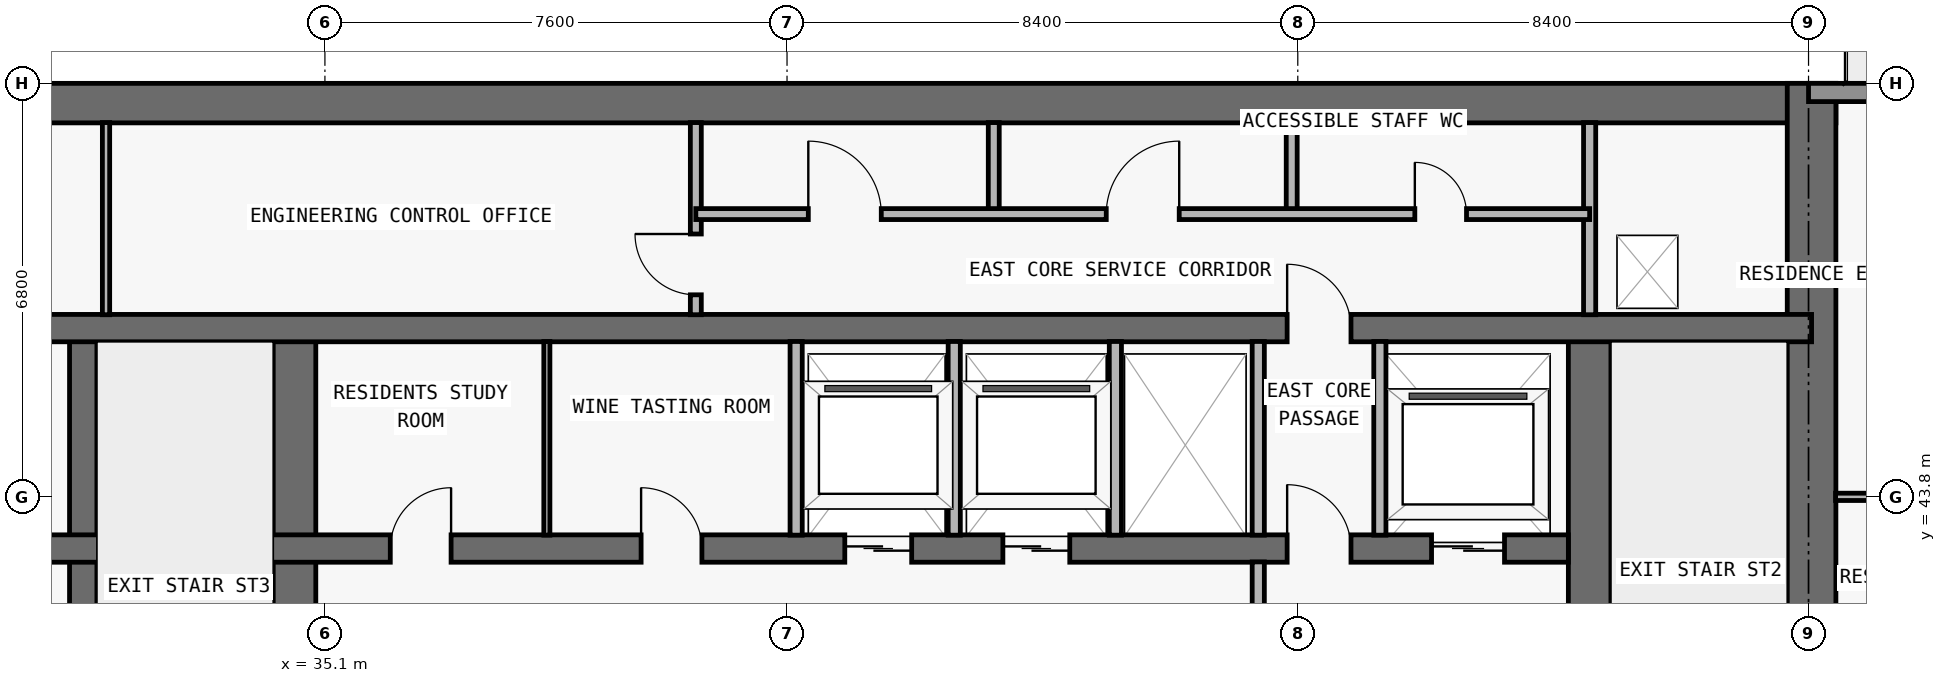
"""IFC4 building model, lengths in metres.
Left out: names, types, materials, properties, quantities, classifications, styles, units other than length and angle.
Written with IfcOpenShell. Run it as: python <this file> out.ifc"""

import sys

from ifc_helpers import new_model, si_unit, direction, frame, frame_2d, origin, place, context, subcontext, project, spatial, rectangle, extrude, element, fill, save


model = new_model("IFC4")
c1 = context("Model", 3, precision=1e-05, world=origin(), true_north=direction((0.0, 1.0)))
c2 = subcontext(c1, "Body", "Model", "MODEL_VIEW")
j1 = project(units=[si_unit("LENGTHUNIT", "METRE"), si_unit("PLANEANGLEUNIT", "RADIAN")], contexts=[c1])
p1 = place(None, origin())
s1 = spatial("IfcSite", under=j1, at=p1, CompositionType="ELEMENT")
p2 = place(p1, origin())
s2 = spatial("IfcBuilding", under=s1, at=p2, CompositionType="ELEMENT")
p3 = place(p2, frame((0.0, 0.0, 119.1)))
s3 = spatial("IfcBuildingStorey", under=s2, at=p3, CompositionType="ELEMENT", Elevation=119.1)
p4 = place(p3, frame((17.85, 50.275, 0.0), z_axis=(0.0, 0.0, 1.0), x_axis=(1.0, 0.0, 0.0)))
e1 = element("IfcWall", 1, at=p4, inside=s3, PredefinedType="SHEAR", context=c2, shape_type="SweptSolid", body=[
    extrude(rectangle(XDim=42.1, YDim=0.65, at=frame_2d((21.05, 0.0))), origin(), (0.0, 0.0, 1.0), 3.05),
])
p5 = place(p3, frame((59.55, 36.55, 0.0), z_axis=(0.0, 0.0, 1.0), x_axis=(0.0, 1.0, 0.0)))
e2 = element("IfcWall", 2, at=p5, inside=s3, PredefinedType="SHEAR", context=c2, shape_type="SweptSolid", body=[
    extrude(rectangle(XDim=14.05, YDim=0.8, at=frame_2d((7.025, 0.0))), origin(), (0.0, 0.0, 1.0), 3.05),
])
p6 = place(p3, frame((55.9, 36.95, 0.0), z_axis=(0.0, 0.0, 1.0), x_axis=(0.0, 1.0, 0.0)))
e3 = element("IfcWall", 3, at=p6, inside=s3, PredefinedType="SHEAR", context=c2, shape_type="SweptSolid", body=[
    extrude(rectangle(XDim=9.625, YDim=0.7, at=frame_2d((4.812, 0.0))), origin(), (0.0, 0.0, 1.0), 3.05),
])
p7 = place(p6, frame((0.6, 0.0, 0.0)))
e4 = element("IfcOpeningElement", 4, at=p7, cuts=e3, PredefinedType="OPENING", context=c2, shape_type="SweptSolid", body=[
    extrude(rectangle(XDim=1.1, YDim=2.15, at=frame_2d((0.55, 1.075))), frame((0.0, 0.36, 0.0), z_axis=(0.0, -1.0, 0.0), x_axis=(1.0, 0.0, 0.0)), (0.0, 0.0, 1.0), 0.72),
])
p8 = place(p3, frame((31.125, 36.95, 0.0), z_axis=(0.0, 0.0, 1.0), x_axis=(0.0, 1.0, 0.0)))
e5 = element("IfcWall", 5, at=p8, inside=s3, PredefinedType="SHEAR", context=c2, shape_type="SweptSolid", body=[
    extrude(rectangle(XDim=9.625, YDim=0.45, at=frame_2d((4.812, 0.0))), origin(), (0.0, 0.0, 1.0), 3.05),
])
p9 = place(p3, frame((34.6, 36.95, 0.0), z_axis=(0.0, 0.0, 1.0), x_axis=(0.0, 1.0, 0.0)))
e6 = element("IfcWall", 6, at=p9, inside=s3, PredefinedType="SHEAR", context=c2, shape_type="SweptSolid", body=[
    extrude(rectangle(XDim=9.625, YDim=0.7, at=frame_2d((4.812, 0.0))), origin(), (0.0, 0.0, 1.0), 3.05),
])
p10 = place(p3, frame((22.25, 42.95, 0.0), z_axis=(0.0, 0.0, 1.0), x_axis=(1.0, 0.0, 0.0)))
e7 = element("IfcWall", 7, at=p10, inside=s3, PredefinedType="SHEAR", context=c2, shape_type="SweptSolid", body=[
    extrude(rectangle(XDim=33.3, YDim=0.45, at=frame_2d((16.65, 0.0))), origin(), (0.0, 0.0, 1.0), 3.05),
])
p11 = place(p10, frame((1.05, 0.0, 0.0)))
e8 = element("IfcOpeningElement", 8, at=p11, cuts=e7, PredefinedType="OPENING", context=c2, shape_type="SweptSolid", body=[
    extrude(rectangle(XDim=1.2, YDim=2.2, at=frame_2d((0.6, 1.1))), frame((0.0, 0.235, 0.0), z_axis=(0.0, -1.0, 0.0), x_axis=(1.0, 0.0, 0.0)), (0.0, 0.0, 1.0), 0.47),
])
p12 = place(p10, frame((31.05, 0.0, 0.0)))
e9 = element("IfcOpeningElement", 9, at=p12, cuts=e7, PredefinedType="OPENING", context=c2, shape_type="SweptSolid", body=[
    extrude(rectangle(XDim=1.2, YDim=2.2, at=frame_2d((0.6, 1.1))), frame((0.0, 0.235, 0.0), z_axis=(0.0, -1.0, 0.0), x_axis=(1.0, 0.0, 0.0)), (0.0, 0.0, 1.0), 0.47),
])
p13 = place(p10, frame((21.4, 0.0, 0.0)))
e10 = element("IfcOpeningElement", 10, at=p13, cuts=e7, PredefinedType="OPENING", context=c2, shape_type="SweptSolid", body=[
    extrude(rectangle(XDim=1.1, YDim=2.2, at=frame_2d((0.55, 1.1))), frame((0.0, 0.235, 0.0), z_axis=(0.0, -1.0, 0.0), x_axis=(1.0, 0.0, 0.0)), (0.0, 0.0, 1.0), 0.47),
])
p14 = place(p10, frame((24.0, 0.0, 0.0)))
e11 = element("IfcOpeningElement", 11, at=p14, cuts=e7, PredefinedType="OPENING", context=c2, shape_type="SweptSolid", body=[
    extrude(rectangle(XDim=1.1, YDim=2.2, at=frame_2d((0.55, 1.1))), frame((0.0, 0.235, 0.0), z_axis=(0.0, -1.0, 0.0), x_axis=(1.0, 0.0, 0.0)), (0.0, 0.0, 1.0), 0.47),
])
p15 = place(p10, frame((3.625, 0.0, 0.0)))
e12 = element("IfcOpeningElement", 12, at=p15, cuts=e7, PredefinedType="OPENING", context=c2, shape_type="SweptSolid", body=[
    extrude(rectangle(XDim=1.05, YDim=2.15, at=frame_2d((0.525, 1.075))), frame((0.0, 0.235, 0.0), z_axis=(0.0, -1.0, 0.0), x_axis=(1.0, 0.0, 0.0)), (0.0, 0.0, 1.0), 0.47),
])
p16 = place(p10, frame((28.675, 0.0, 0.0)))
e13 = element("IfcOpeningElement", 13, at=p16, cuts=e7, PredefinedType="OPENING", context=c2, shape_type="SweptSolid", body=[
    extrude(rectangle(XDim=1.05, YDim=2.15, at=frame_2d((0.525, 1.075))), frame((0.0, 0.235, 0.0), z_axis=(0.0, -1.0, 0.0), x_axis=(1.0, 0.0, 0.0)), (0.0, 0.0, 1.0), 0.47),
])
p17 = place(p10, frame((13.925, 0.0, 0.0)))
e14 = element("IfcOpeningElement", 14, at=p17, cuts=e7, PredefinedType="OPENING", context=c2, shape_type="SweptSolid", body=[
    extrude(rectangle(XDim=1.0, YDim=2.2, at=frame_2d((0.5, 1.1))), frame((0.0, 0.235, 0.0), z_axis=(0.0, -1.0, 0.0), x_axis=(1.0, 0.0, 0.0)), (0.0, 0.0, 1.0), 0.47),
])
p18 = place(p10, frame((18.05, 0.0, 0.0)))
e15 = element("IfcOpeningElement", 15, at=p18, cuts=e7, PredefinedType="OPENING", context=c2, shape_type="SweptSolid", body=[
    extrude(rectangle(XDim=1.0, YDim=2.2, at=frame_2d((0.5, 1.1))), frame((0.0, 0.235, 0.0), z_axis=(0.0, -1.0, 0.0), x_axis=(1.0, 0.0, 0.0)), (0.0, 0.0, 1.0), 0.47),
])
p19 = place(p3, frame((18.25, 46.575, 0.0), z_axis=(0.0, 0.0, 1.0), x_axis=(1.0, 0.0, 0.0)))
e16 = element("IfcWall", 16, at=p19, inside=s3, PredefinedType="SHEAR", context=c2, shape_type="SweptSolid", body=[
    extrude(rectangle(XDim=41.3, YDim=0.45, at=frame_2d((20.65, 0.0))), origin(), (0.0, 0.0, 1.0), 3.05),
])
p20 = place(p19, frame((7.65, 0.0, 0.0)))
e17 = element("IfcOpeningElement", 17, at=p20, cuts=e16, PredefinedType="OPENING", context=c2, shape_type="SweptSolid", body=[
    extrude(rectangle(XDim=1.0, YDim=2.2, at=frame_2d((0.5, 1.1))), frame((0.0, 0.235, 0.0), z_axis=(0.0, -1.0, 0.0), x_axis=(1.0, 0.0, 0.0)), (0.0, 0.0, 1.0), 0.47),
])
p21 = place(p19, frame((32.675, 0.0, 0.0)))
e18 = element("IfcOpeningElement", 18, at=p21, cuts=e16, PredefinedType="OPENING", context=c2, shape_type="SweptSolid", body=[
    extrude(rectangle(XDim=1.05, YDim=2.15, at=frame_2d((0.525, 1.075))), frame((0.0, 0.235, 0.0), z_axis=(0.0, -1.0, 0.0), x_axis=(1.0, 0.0, 0.0)), (0.0, 0.0, 1.0), 0.47),
])
p22 = place(p3, frame((59.5, 50.45, 0.0), z_axis=(0.0, 0.0, 1.0), x_axis=(1.0, 0.0, 0.0)))
e19 = element("IfcWall", 19, at=p22, inside=s3, PredefinedType="STANDARD", context=c2, shape_type="SweptSolid", body=[
    extrude(rectangle(XDim=10.6, YDim=0.3, at=frame_2d((5.3, 0.0))), origin(), (0.0, 0.0, 1.0), 3.05),
])
p23 = place(p22, frame((4.3, 0.0, 0.0)))
e20 = element("IfcOpeningElement", 20, at=p23, cuts=e19, PredefinedType="OPENING", context=c2, shape_type="SweptSolid", body=[
    extrude(rectangle(XDim=2.0, YDim=2.3, at=frame_2d((1.0, 1.15))), frame((0.0, 0.16, 0.0), z_axis=(0.0, -1.0, 0.0), x_axis=(1.0, 0.0, 0.0)), (0.0, 0.0, 1.0), 0.32),
])
p24 = place(p3, frame((31.5, 46.795, 0.0), z_axis=(0.0, 0.0, 1.0), x_axis=(0.0, 1.0, 0.0)))
e21 = element("IfcWall", 21, at=p24, inside=s3, PredefinedType="PARTITIONING", context=c2, shape_type="SweptSolid", body=[
    extrude(rectangle(XDim=3.16, YDim=0.12, at=frame_2d((1.58, 0.0))), origin(), (0.0, 0.0, 1.0), 3.05),
])
p25 = place(p3, frame((38.75, 43.17, 0.0), z_axis=(0.0, 0.0, 1.0), x_axis=(0.0, 1.0, 0.0)))
e22 = element("IfcWall", 22, at=p25, inside=s3, PredefinedType="MOVABLE", context=c2, shape_type="SweptSolid", body=[
    extrude(rectangle(XDim=3.185, YDim=0.1, at=frame_2d((1.593, 0.0))), origin(), (0.0, 0.0, 1.0), 3.05),
])
p26 = place(p3, frame((41.2, 46.795, 0.0), z_axis=(0.0, 0.0, 1.0), x_axis=(0.0, 1.0, 0.0)))
e23 = element("IfcWall", 23, at=p26, inside=s3, PredefinedType="PARTITIONING", context=c2, shape_type="SweptSolid", body=[
    extrude(rectangle(XDim=3.16, YDim=0.18, at=frame_2d((1.58, 0.0))), origin(), (0.0, 0.0, 1.0), 3.05),
])
p27 = place(p26, frame((0.327, 0.0, 0.0)))
e24 = element("IfcOpeningElement", 24, at=p27, cuts=e23, PredefinedType="OPENING", context=c2, shape_type="SweptSolid", body=[
    extrude(rectangle(XDim=1.0, YDim=2.2, at=frame_2d((0.5, 1.1))), frame((0.0, 0.1, 0.0), z_axis=(0.0, -1.0, 0.0), x_axis=(1.0, 0.0, 0.0)), (0.0, 0.0, 1.0), 0.2),
])
for number, where, z_axis, x_axis in (
    (25, (42.85, 43.17, 0.0), (0.0, 0.0, 1.0), (0.0, 1.0, 0.0)),
    (26, (45.45, 43.17, 0.0), (0.0, 0.0, 1.0), (0.0, 1.0, 0.0)),
):
    element("IfcWall", number, at=place(p3, frame(where, z_axis=z_axis, x_axis=x_axis)), inside=s3, PredefinedType="PARTITIONING", context=c2, shape_type="SweptSolid", body=[
        extrude(rectangle(XDim=3.185, YDim=0.2, at=frame_2d((1.593, 0.0))), origin(), (0.0, 0.0, 1.0), 3.05),
    ])
p28 = place(p3, frame((46.1, 48.45, 0.0), z_axis=(0.0, 0.0, 1.0), x_axis=(0.0, 1.0, 0.0)))
e27 = element("IfcWall", 27, at=p28, inside=s3, PredefinedType="PARTITIONING", context=c2, shape_type="SweptSolid", body=[
    extrude(rectangle(XDim=1.505, YDim=0.18, at=frame_2d((0.752, 0.0))), origin(), (0.0, 0.0, 1.0), 3.05),
])
p29 = place(p3, frame((48.1, 43.17, 0.0), z_axis=(0.0, 0.0, 1.0), x_axis=(0.0, 1.0, 0.0)))
e28 = element("IfcWall", 28, at=p29, inside=s3, PredefinedType="PARTITIONING", context=c2, shape_type="SweptSolid", body=[
    extrude(rectangle(XDim=3.185, YDim=0.2, at=frame_2d((1.593, 0.0))), origin(), (0.0, 0.0, 1.0), 3.05),
])
p30 = place(p3, frame((50.45, 37.345, 0.0), z_axis=(0.0, 0.0, 1.0), x_axis=(0.0, 1.0, 0.0)))
e29 = element("IfcWall", 29, at=p30, inside=s3, PredefinedType="PARTITIONING", context=c2, shape_type="SweptSolid", body=[
    extrude(rectangle(XDim=5.385, YDim=0.2, at=frame_2d((2.692, 0.0))), origin(), (0.0, 0.0, 1.0), 3.05),
])
p31 = place(p3, frame((50.45, 43.17, 0.0), z_axis=(0.0, 0.0, 1.0), x_axis=(0.0, 1.0, 0.0)))
e30 = element("IfcWall", 30, at=p31, inside=s3, PredefinedType="PARTITIONING", context=c2, shape_type="SweptSolid", body=[
    extrude(rectangle(XDim=3.185, YDim=0.2, at=frame_2d((1.593, 0.0))), origin(), (0.0, 0.0, 1.0), 3.05),
])
p32 = place(p3, frame((51.0, 48.45, 0.0), z_axis=(0.0, 0.0, 1.0), x_axis=(0.0, 1.0, 0.0)))
e31 = element("IfcWall", 31, at=p32, inside=s3, PredefinedType="PARTITIONING", context=c2, shape_type="SweptSolid", body=[
    extrude(rectangle(XDim=1.505, YDim=0.18, at=frame_2d((0.752, 0.0))), origin(), (0.0, 0.0, 1.0), 3.05),
])
p33 = place(p3, frame((52.45, 43.17, 0.0), z_axis=(0.0, 0.0, 1.0), x_axis=(0.0, 1.0, 0.0)))
e32 = element("IfcWall", 32, at=p33, inside=s3, PredefinedType="PARTITIONING", context=c2, shape_type="SweptSolid", body=[
    extrude(rectangle(XDim=3.185, YDim=0.2, at=frame_2d((1.593, 0.0))), origin(), (0.0, 0.0, 1.0), 3.05),
])
p34 = place(p3, frame((55.9, 46.795, 0.0), z_axis=(0.0, 0.0, 1.0), x_axis=(0.0, 1.0, 0.0)))
e33 = element("IfcWall", 33, at=p34, inside=s3, PredefinedType="PARTITIONING", context=c2, shape_type="SweptSolid", body=[
    extrude(rectangle(XDim=3.16, YDim=0.2, at=frame_2d((1.58, 0.0))), origin(), (0.0, 0.0, 1.0), 3.05),
])
p35 = place(p3, frame((59.945, 43.8, 0.0), z_axis=(0.0, 0.0, 1.0), x_axis=(1.0, 0.0, 0.0)))
e34 = element("IfcWall", 34, at=p35, inside=s3, PredefinedType="PARTITIONING", context=c2, shape_type="SweptSolid", body=[
    extrude(rectangle(XDim=13.66, YDim=0.12, at=frame_2d((6.83, 0.0))), origin(), (0.0, 0.0, 1.0), 2.339),
])
p36 = place(p35, frame((4.017, 0.0, 0.0)))
e35 = element("IfcOpeningElement", 35, at=p36, cuts=e34, PredefinedType="OPENING", context=c2, shape_type="SweptSolid", body=[
    extrude(rectangle(XDim=0.9, YDim=2.15, at=frame_2d((0.45, 1.075))), frame((0.0, 0.07, 0.0), z_axis=(0.0, -1.0, 0.0), x_axis=(1.0, 0.0, 0.0)), (0.0, 0.0, 1.0), 0.14),
])
p37 = place(p35, frame((0.702, 0.0, 0.0)))
e36 = element("IfcOpeningElement", 36, at=p37, cuts=e34, PredefinedType="OPENING", context=c2, shape_type="SweptSolid", body=[
    extrude(rectangle(XDim=0.85, YDim=2.1, at=frame_2d((0.425, 1.05))), frame((0.0, 0.07, 0.0), z_axis=(0.0, -1.0, 0.0), x_axis=(1.0, 0.0, 0.0)), (0.0, 0.0, 1.0), 0.14),
])
p38 = place(p3, frame((41.2, 48.45, 0.0), z_axis=(0.0, 0.0, 1.0), x_axis=(1.0, 0.0, 0.0)))
e37 = element("IfcWall", 37, at=p38, inside=s3, PredefinedType="PARTITIONING", context=c2, shape_type="SweptSolid", body=[
    extrude(rectangle(XDim=14.7, YDim=0.18, at=frame_2d((7.35, 0.0))), origin(), (0.0, 0.0, 1.0), 3.05),
])
p39 = place(p38, frame((1.85, 0.0, 0.0)))
e38 = element("IfcOpeningElement", 38, at=p39, cuts=e37, PredefinedType="OPENING", context=c2, shape_type="SweptSolid", body=[
    extrude(rectangle(XDim=1.2, YDim=2.2, at=frame_2d((0.6, 1.1))), frame((0.0, 0.1, 0.0), z_axis=(0.0, -1.0, 0.0), x_axis=(1.0, 0.0, 0.0)), (0.0, 0.0, 1.0), 0.2),
])
p40 = place(p38, frame((6.75, 0.0, 0.0)))
e39 = element("IfcOpeningElement", 39, at=p40, cuts=e37, PredefinedType="OPENING", context=c2, shape_type="SweptSolid", body=[
    extrude(rectangle(XDim=1.2, YDim=2.2, at=frame_2d((0.6, 1.1))), frame((0.0, 0.1, 0.0), z_axis=(0.0, -1.0, 0.0), x_axis=(1.0, 0.0, 0.0)), (0.0, 0.0, 1.0), 0.2),
])
p41 = place(p38, frame((11.825, 0.0, 0.0)))
e40 = element("IfcOpeningElement", 40, at=p41, cuts=e37, PredefinedType="OPENING", context=c2, shape_type="SweptSolid", body=[
    extrude(rectangle(XDim=0.85, YDim=2.1, at=frame_2d((0.425, 1.05))), frame((0.0, 0.1, 0.0), z_axis=(0.0, -1.0, 0.0), x_axis=(1.0, 0.0, 0.0)), (0.0, 0.0, 1.0), 0.2),
])
p42 = place(p12, origin())
e41 = element("IfcDoor", 41, at=p42, inside=s3, OperationType="DOUBLE_DOOR_SLIDING", PredefinedType="DOOR", context=c2, shape_type="SweptSolid", body=[
    extrude(rectangle(XDim=1.2, YDim=2.2, at=frame_2d((0.6, 1.1))), frame((0.0, 0.025, 0.0), z_axis=(0.0, -1.0, 0.0), x_axis=(1.0, 0.0, 0.0)), (0.0, 0.0, 1.0), 0.05),
])
fill(e9, e41)
p43 = place(p13, origin())
e42 = element("IfcDoor", 42, at=p43, inside=s3, OperationType="DOUBLE_DOOR_SLIDING", PredefinedType="DOOR", context=c2, shape_type="SweptSolid", body=[
    extrude(rectangle(XDim=1.1, YDim=2.2, at=frame_2d((0.55, 1.1))), frame((0.0, 0.025, 0.0), z_axis=(0.0, -1.0, 0.0), x_axis=(1.0, 0.0, 0.0)), (0.0, 0.0, 1.0), 0.05),
])
fill(e10, e42)
p44 = place(p14, origin())
e43 = element("IfcDoor", 43, at=p44, inside=s3, OperationType="DOUBLE_DOOR_SLIDING", PredefinedType="DOOR", context=c2, shape_type="SweptSolid", body=[
    extrude(rectangle(XDim=1.1, YDim=2.2, at=frame_2d((0.55, 1.1))), frame((0.0, 0.025, 0.0), z_axis=(0.0, -1.0, 0.0), x_axis=(1.0, 0.0, 0.0)), (0.0, 0.0, 1.0), 0.05),
])
fill(e11, e43)
p45 = place(p16, origin())
e44 = element("IfcDoor", 44, at=p45, inside=s3, OperationType="SINGLE_SWING_LEFT", PredefinedType="DOOR", context=c2, shape_type="SweptSolid", body=[
    extrude(rectangle(XDim=1.05, YDim=2.15, at=frame_2d((0.525, 1.075))), frame((0.0, 0.025, 0.0), z_axis=(0.0, -1.0, 0.0), x_axis=(1.0, 0.0, 0.0)), (0.0, 0.0, 1.0), 0.05),
])
fill(e13, e44)
p46 = place(p17, origin())
e45 = element("IfcDoor", 45, at=p46, inside=s3, OperationType="SINGLE_SWING_RIGHT", PredefinedType="DOOR", context=c2, shape_type="SweptSolid", body=[
    extrude(rectangle(XDim=1.0, YDim=2.2, at=frame_2d((0.5, 1.1))), frame((0.0, 0.025, 0.0), z_axis=(0.0, -1.0, 0.0), x_axis=(1.0, 0.0, 0.0)), (0.0, 0.0, 1.0), 0.05),
])
fill(e14, e45)
p47 = place(p18, origin())
e46 = element("IfcDoor", 46, at=p47, inside=s3, OperationType="SINGLE_SWING_LEFT", PredefinedType="DOOR", context=c2, shape_type="SweptSolid", body=[
    extrude(rectangle(XDim=1.0, YDim=2.2, at=frame_2d((0.5, 1.1))), frame((0.0, 0.025, 0.0), z_axis=(0.0, -1.0, 0.0), x_axis=(1.0, 0.0, 0.0)), (0.0, 0.0, 1.0), 0.05),
])
fill(e15, e46)
p48 = place(p21, origin())
e47 = element("IfcDoor", 47, at=p48, inside=s3, OperationType="SINGLE_SWING_LEFT", PredefinedType="DOOR", context=c2, shape_type="SweptSolid", body=[
    extrude(rectangle(XDim=1.05, YDim=2.15, at=frame_2d((0.525, 1.075))), frame((0.0, 0.025, 0.0), z_axis=(0.0, -1.0, 0.0), x_axis=(1.0, 0.0, 0.0)), (0.0, 0.0, 1.0), 0.05),
])
fill(e18, e47)
p49 = place(p27, origin())
e48 = element("IfcDoor", 48, at=p49, inside=s3, OperationType="SINGLE_SWING_RIGHT", PredefinedType="DOOR", context=c2, shape_type="SweptSolid", body=[
    extrude(rectangle(XDim=1.0, YDim=2.2, at=frame_2d((0.5, 1.1))), frame((0.0, 0.025, 0.0), z_axis=(0.0, -1.0, 0.0), x_axis=(1.0, 0.0, 0.0)), (0.0, 0.0, 1.0), 0.05),
])
fill(e24, e48)
p50 = place(p39, origin())
e49 = element("IfcDoor", 49, at=p50, inside=s3, OperationType="SINGLE_SWING_LEFT", PredefinedType="DOOR", context=c2, shape_type="SweptSolid", body=[
    extrude(rectangle(XDim=1.2, YDim=2.2, at=frame_2d((0.6, 1.1))), frame((0.0, 0.025, 0.0), z_axis=(0.0, -1.0, 0.0), x_axis=(1.0, 0.0, 0.0)), (0.0, 0.0, 1.0), 0.05),
])
fill(e38, e49)
p51 = place(p40, origin())
e50 = element("IfcDoor", 50, at=p51, inside=s3, OperationType="SINGLE_SWING_RIGHT", PredefinedType="DOOR", context=c2, shape_type="SweptSolid", body=[
    extrude(rectangle(XDim=1.2, YDim=2.2, at=frame_2d((0.6, 1.1))), frame((0.0, 0.025, 0.0), z_axis=(0.0, -1.0, 0.0), x_axis=(1.0, 0.0, 0.0)), (0.0, 0.0, 1.0), 0.05),
])
fill(e39, e50)
p52 = place(p41, origin())
e51 = element("IfcDoor", 51, at=p52, inside=s3, OperationType="SINGLE_SWING_LEFT", PredefinedType="DOOR", context=c2, shape_type="SweptSolid", body=[
    extrude(rectangle(XDim=0.85, YDim=2.1, at=frame_2d((0.425, 1.05))), frame((0.0, 0.025, 0.0), z_axis=(0.0, -1.0, 0.0), x_axis=(1.0, 0.0, 0.0)), (0.0, 0.0, 1.0), 0.05),
])
fill(e40, e51)
save(model, sys.argv[1])
